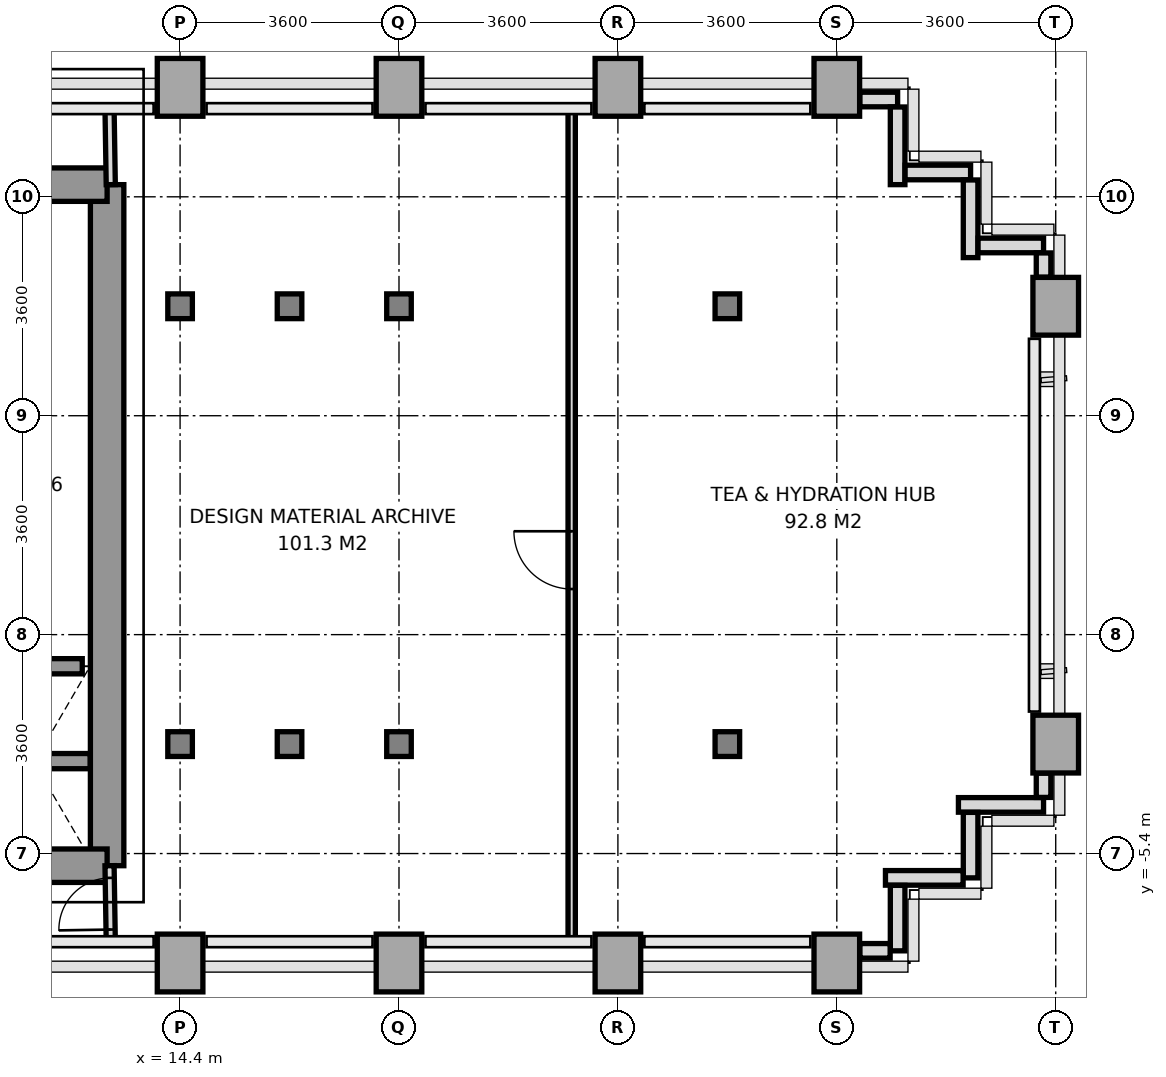
"""IFC4 building model, lengths in metres.
Left out: names, types, materials, properties, quantities, classifications, styles, units other than length and angle.
Written with IfcOpenShell. Run it as: python <this file> out.ifc"""

import sys

from ifc_helpers import new_model, si_unit, direction, frame, frame_2d, origin, origin_2d, place, context, subcontext, project, spatial, rectangle, i_section, extrude, source, transform, mapped, element, fill, save


model = new_model("IFC4")
c1 = context("Model", 3, precision=1e-05, world=origin(), true_north=direction((0.0, 1.0)))
c2 = subcontext(c1, "Body", "Model", "MODEL_VIEW")
j1 = project(units=[si_unit("LENGTHUNIT", "METRE"), si_unit("PLANEANGLEUNIT", "RADIAN")], contexts=[c1])
p1 = place(None, origin())
s1 = spatial("IfcSite", under=j1, at=p1, CompositionType="ELEMENT")
p2 = place(p1, origin())
s2 = spatial("IfcBuilding", under=s1, at=p2, CompositionType="ELEMENT")
p3 = place(p2, frame((0.0, 0.0, 51.0)))
s3 = spatial("IfcBuildingStorey", under=s2, at=p3, CompositionType="ELEMENT", Elevation=51.0)
m1 = source(origin(), c2, "Body", "SweptSolid", [
    extrude(rectangle(XDim=0.75, YDim=0.95, at=origin_2d()), origin(), (0.0, 0.0, 1.0), 3.2),
])
p4 = place(p3, frame((14.4, -7.2, 0.0), z_axis=(0.0, 0.0, 1.0), x_axis=(1.0, 0.0, 0.0)))
e1 = element("IfcColumn", 1, at=p4, inside=s3, PredefinedType="COLUMN", context=c2, shape_type="MappedRepresentation", body=[
    mapped(m1, transform((0.0, 0.0, 0.0), x_axis=(1.0, 0.0, 0.0), y_axis=(0.0, 1.0, 0.0), z_axis=(0.0, 0.0, 1.0), scale=1.0)),
])
m2 = source(origin(), c2, "Body", "SweptSolid", [
    extrude(i_section(OverallWidth=0.404, OverallDepth=0.407, WebThickness=0.022, FlangeThickness=0.035, at=origin_2d()), origin(), (0.0, 0.0, 1.0), 3.2),
])
for number, where, z_axis, x_axis in (
    (2, (14.4, -3.6, 0.0), (0.0, 0.0, 1.0), (1.0, 0.0, 0.0)),
    (3, (14.4, 3.6, 0.0), (0.0, 0.0, 1.0), (1.0, 0.0, 0.0)),
):
    element("IfcColumn", number, at=place(p3, frame(where, z_axis=z_axis, x_axis=x_axis)), inside=s3, PredefinedType="COLUMN", context=c2, shape_type="MappedRepresentation", body=[
        mapped(m2, transform((0.0, 0.0, 0.0), x_axis=(1.0, 0.0, 0.0), y_axis=(0.0, 1.0, 0.0), z_axis=(0.0, 0.0, 1.0), scale=1.0)),
    ])
p5 = place(p3, frame((14.4, 7.2, 0.0), z_axis=(0.0, 0.0, 1.0), x_axis=(1.0, 0.0, 0.0)))
e4 = element("IfcColumn", 4, at=p5, inside=s3, PredefinedType="COLUMN", context=c2, shape_type="MappedRepresentation", body=[
    mapped(m1, transform((0.0, 0.0, 0.0), x_axis=(1.0, 0.0, 0.0), y_axis=(0.0, 1.0, 0.0), z_axis=(0.0, 0.0, 1.0), scale=1.0)),
])
for number, where, z_axis, x_axis in (
    (5, (16.2, -3.6, 0.0), (0.0, 0.0, 1.0), (1.0, 0.0, 0.0)),
    (6, (16.2, 3.6, 0.0), (0.0, 0.0, 1.0), (1.0, 0.0, 0.0)),
):
    element("IfcColumn", number, at=place(p3, frame(where, z_axis=z_axis, x_axis=x_axis)), inside=s3, PredefinedType="COLUMN", context=c2, shape_type="MappedRepresentation", body=[
        mapped(m2, transform((0.0, 0.0, 0.0), x_axis=(1.0, 0.0, 0.0), y_axis=(0.0, 1.0, 0.0), z_axis=(0.0, 0.0, 1.0), scale=1.0)),
    ])
p6 = place(p3, frame((18.0, -7.2, 0.0), z_axis=(0.0, 0.0, 1.0), x_axis=(1.0, 0.0, 0.0)))
e7 = element("IfcColumn", 7, at=p6, inside=s3, PredefinedType="COLUMN", context=c2, shape_type="MappedRepresentation", body=[
    mapped(m1, transform((0.0, 0.0, 0.0), x_axis=(1.0, 0.0, 0.0), y_axis=(0.0, 1.0, 0.0), z_axis=(0.0, 0.0, 1.0), scale=1.0)),
])
for number, where, z_axis, x_axis in (
    (8, (18.0, -3.6, 0.0), (0.0, 0.0, 1.0), (1.0, 0.0, 0.0)),
    (9, (18.0, 3.6, 0.0), (0.0, 0.0, 1.0), (1.0, 0.0, 0.0)),
):
    element("IfcColumn", number, at=place(p3, frame(where, z_axis=z_axis, x_axis=x_axis)), inside=s3, PredefinedType="COLUMN", context=c2, shape_type="MappedRepresentation", body=[
        mapped(m2, transform((0.0, 0.0, 0.0), x_axis=(1.0, 0.0, 0.0), y_axis=(0.0, 1.0, 0.0), z_axis=(0.0, 0.0, 1.0), scale=1.0)),
    ])
for number, where, z_axis, x_axis in (
    (10, (18.0, 7.2, 0.0), (0.0, 0.0, 1.0), (1.0, 0.0, 0.0)),
    (11, (21.6, -7.2, 0.0), (0.0, 0.0, 1.0), (1.0, 0.0, 0.0)),
    (12, (21.6, 7.2, 0.0), (0.0, 0.0, 1.0), (1.0, 0.0, 0.0)),
):
    element("IfcColumn", number, at=place(p3, frame(where, z_axis=z_axis, x_axis=x_axis)), inside=s3, PredefinedType="COLUMN", context=c2, shape_type="MappedRepresentation", body=[
        mapped(m1, transform((0.0, 0.0, 0.0), x_axis=(1.0, 0.0, 0.0), y_axis=(0.0, 1.0, 0.0), z_axis=(0.0, 0.0, 1.0), scale=1.0)),
    ])
for number, where, z_axis, x_axis in (
    (13, (23.4, -3.6, 0.0), (0.0, 0.0, 1.0), (1.0, 0.0, 0.0)),
    (14, (23.4, 3.6, 0.0), (0.0, 0.0, 1.0), (1.0, 0.0, 0.0)),
):
    element("IfcColumn", number, at=place(p3, frame(where, z_axis=z_axis, x_axis=x_axis)), inside=s3, PredefinedType="COLUMN", context=c2, shape_type="MappedRepresentation", body=[
        mapped(m2, transform((0.0, 0.0, 0.0), x_axis=(1.0, 0.0, 0.0), y_axis=(0.0, 1.0, 0.0), z_axis=(0.0, 0.0, 1.0), scale=1.0)),
    ])
for number, where, z_axis, x_axis in (
    (15, (25.2, -7.2, 0.0), (0.0, 0.0, 1.0), (1.0, 0.0, 0.0)),
    (16, (25.2, 7.2, 0.0), (0.0, 0.0, 1.0), (1.0, 0.0, 0.0)),
    (17, (28.8, -3.6, 0.0), (0.0, 0.0, 1.0), (1.0, 0.0, 0.0)),
    (18, (28.8, 3.6, 0.0), (0.0, 0.0, 1.0), (1.0, 0.0, 0.0)),
):
    element("IfcColumn", number, at=place(p3, frame(where, z_axis=z_axis, x_axis=x_axis)), inside=s3, PredefinedType="COLUMN", context=c2, shape_type="MappedRepresentation", body=[
        mapped(m1, transform((0.0, 0.0, 0.0), x_axis=(1.0, 0.0, 0.0), y_axis=(0.0, 1.0, 0.0), z_axis=(0.0, 0.0, 1.0), scale=1.0)),
    ])
p7 = place(p3, frame((28.6, -4.6, 0.0), z_axis=(0.0, 0.0, 1.0), x_axis=(-1.0, 0.0, 0.0)))
e19 = element("IfcWall", 19, at=p7, inside=s3, PredefinedType="PARAPET", context=c2, shape_type="SweptSolid", body=[
    extrude(rectangle(XDim=1.4, YDim=0.24, at=frame_2d((0.7, 0.0))), origin(), (0.0, 0.0, 1.0), 1.15),
])
p8 = place(p3, frame((27.4, -4.723, 0.0), z_axis=(0.0, 0.0, 1.0), x_axis=(0.0, -1.0, 0.0)))
e20 = element("IfcWall", 20, at=p8, inside=s3, PredefinedType="PARAPET", context=c2, shape_type="SweptSolid", body=[
    extrude(rectangle(XDim=1.077, YDim=0.24, at=frame_2d((0.539, 0.0))), origin(), (0.0, 0.0, 1.0), 1.15),
])
p9 = place(p3, frame((27.277, -5.8, 0.0), z_axis=(0.0, 0.0, 1.0), x_axis=(-1.0, 0.0, 0.0)))
e21 = element("IfcWall", 21, at=p9, inside=s3, PredefinedType="PARAPET", context=c2, shape_type="SweptSolid", body=[
    extrude(rectangle(XDim=1.277, YDim=0.24, at=frame_2d((0.639, 0.0))), origin(), (0.0, 0.0, 1.0), 1.15),
])
p10 = place(p3, frame((26.2, -5.923, 0.0), z_axis=(0.0, 0.0, 1.0), x_axis=(0.0, -1.0, 0.0)))
e22 = element("IfcWall", 22, at=p10, inside=s3, PredefinedType="PARAPET", context=c2, shape_type="SweptSolid", body=[
    extrude(rectangle(XDim=1.077, YDim=0.24, at=frame_2d((0.539, 0.0))), origin(), (0.0, 0.0, 1.0), 1.15),
])
p11 = place(p3, frame((26.077, -7.0, 0.0), z_axis=(0.0, 0.0, 1.0), x_axis=(-1.0, 0.0, 0.0)))
e23 = element("IfcWall", 23, at=p11, inside=s3, PredefinedType="PARAPET", context=c2, shape_type="SweptSolid", body=[
    extrude(rectangle(XDim=0.499, YDim=0.24, at=frame_2d((0.25, 0.0))), origin(), (0.0, 0.0, 1.0), 1.15),
])
p12 = place(p3, frame((25.578, 7.0, 0.0), z_axis=(0.0, 0.0, 1.0), x_axis=(1.0, 0.0, 0.0)))
e24 = element("IfcWall", 24, at=p12, inside=s3, PredefinedType="PARAPET", context=c2, shape_type="SweptSolid", body=[
    extrude(rectangle(XDim=0.622, YDim=0.24, at=frame_2d((0.311, 0.0))), origin(), (0.0, 0.0, 1.0), 1.15),
])
p13 = place(p3, frame((26.2, 6.877, 0.0), z_axis=(0.0, 0.0, 1.0), x_axis=(0.0, -1.0, 0.0)))
e25 = element("IfcWall", 25, at=p13, inside=s3, PredefinedType="PARAPET", context=c2, shape_type="SweptSolid", body=[
    extrude(rectangle(XDim=1.277, YDim=0.24, at=frame_2d((0.638, 0.0))), origin(), (0.0, 0.0, 1.0), 1.15),
])
p14 = place(p3, frame((26.323, 5.8, 0.0), z_axis=(0.0, 0.0, 1.0), x_axis=(1.0, 0.0, 0.0)))
e26 = element("IfcWall", 26, at=p14, inside=s3, PredefinedType="PARAPET", context=c2, shape_type="SweptSolid", body=[
    extrude(rectangle(XDim=1.077, YDim=0.24, at=frame_2d((0.539, 0.0))), origin(), (0.0, 0.0, 1.0), 1.15),
])
p15 = place(p3, frame((27.4, 5.677, 0.0), z_axis=(0.0, 0.0, 1.0), x_axis=(0.0, -1.0, 0.0)))
e27 = element("IfcWall", 27, at=p15, inside=s3, PredefinedType="PARAPET", context=c2, shape_type="SweptSolid", body=[
    extrude(rectangle(XDim=1.277, YDim=0.24, at=frame_2d((0.639, 0.0))), origin(), (0.0, 0.0, 1.0), 1.15),
])
p16 = place(p3, frame((27.523, 4.6, 0.0), z_axis=(0.0, 0.0, 1.0), x_axis=(1.0, 0.0, 0.0)))
e28 = element("IfcWall", 28, at=p16, inside=s3, PredefinedType="PARAPET", context=c2, shape_type="SweptSolid", body=[
    extrude(rectangle(XDim=1.077, YDim=0.24, at=frame_2d((0.539, 0.0))), origin(), (0.0, 0.0, 1.0), 1.15),
])
for number, where, z_axis, x_axis in (
    (29, (28.6, 4.477, 0.0), (0.0, 0.0, 1.0), (0.0, -1.0, 0.0)),
    (30, (28.6, -4.078, 0.0), (0.0, 0.0, 1.0), (0.0, -1.0, 0.0)),
):
    element("IfcWall", number, at=place(p3, frame(where, z_axis=z_axis, x_axis=x_axis)), inside=s3, PredefinedType="PARAPET", context=c2, shape_type="SweptSolid", body=[
        extrude(rectangle(XDim=0.399, YDim=0.24, at=frame_2d((0.2, 0.0))), origin(), (0.0, 0.0, 1.0), 1.15),
    ])
p17 = place(p3, frame((13.2, -5.6, 0.0), z_axis=(0.0, 0.0, 1.0), x_axis=(0.0, 1.0, 0.0)))
e31 = element("IfcWall", 31, at=p17, inside=s3, PredefinedType="SHEAR", context=c2, shape_type="SweptSolid", body=[
    extrude(rectangle(XDim=11.2, YDim=0.55, at=frame_2d((5.6, 0.0))), origin(), (0.0, 0.0, 1.0), 3.2),
])
p18 = place(p3, frame((11.381, 5.6, 0.0), z_axis=(0.0, 0.0, 1.0), x_axis=(1.0, 0.0, 0.0)))
e32 = element("IfcWall", 32, at=p18, inside=s3, PredefinedType="SHEAR", context=c2, shape_type="SweptSolid", body=[
    extrude(rectangle(XDim=1.819, YDim=0.55, at=frame_2d((0.909, 0.0))), origin(), (0.0, 0.0, 1.0), 3.2),
])
p19 = place(p3, frame((5.4, -5.6, 0.0), z_axis=(0.0, 0.0, 1.0), x_axis=(1.0, 0.0, 0.0)))
e33 = element("IfcWall", 33, at=p19, inside=s3, PredefinedType="SHEAR", context=c2, shape_type="SweptSolid", body=[
    extrude(rectangle(XDim=7.8, YDim=0.55, at=frame_2d((3.9, 0.0))), origin(), (0.0, 0.0, 1.0), 3.2),
])
p20 = place(p19, frame((3.0, 0.0, 0.0)))
e34 = element("IfcOpeningElement", 34, at=p20, cuts=e33, PredefinedType="OPENING", context=c2, shape_type="SweptSolid", body=[
    extrude(rectangle(XDim=1.2, YDim=2.2, at=frame_2d((0.6, 1.1))), frame((0.0, 0.285, 0.0), z_axis=(0.0, -1.0, 0.0), x_axis=(1.0, 0.0, 0.0)), (0.0, 0.0, 1.0), 0.57),
])
p21 = place(p3, frame((11.08, -3.88, 0.0), z_axis=(0.0, 0.0, 1.0), x_axis=(1.0, 0.0, 0.0)))
e35 = element("IfcWall", 35, at=p21, inside=s3, PredefinedType="SOLIDWALL", context=c2, shape_type="SweptSolid", body=[
    extrude(rectangle(XDim=1.84, YDim=0.25, at=frame_2d((0.92, 0.0))), origin(), (0.0, 0.0, 1.0), 3.2),
])
p22 = place(p3, frame((11.209, -2.32, 0.0), z_axis=(0.0, 0.0, 1.0), x_axis=(1.0, 0.0, 0.0)))
e36 = element("IfcWall", 36, at=p22, inside=s3, PredefinedType="SOLIDWALL", context=c2, shape_type="SweptSolid", body=[
    extrude(rectangle(XDim=1.582, YDim=0.25, at=frame_2d((0.791, 0.0))), origin(), (0.0, 0.0, 1.0), 3.2),
])
p23 = place(p3, frame((13.26, 5.6, 0.0), z_axis=(0.0, 0.0, 1.0), x_axis=(-0.016013571389, 0.999871774545, 0.0)))
e37 = element("IfcWall", 37, at=p23, inside=s3, PredefinedType="PARTITIONING", context=c2, shape_type="SweptSolid", body=[
    extrude(rectangle(XDim=1.25, YDim=0.15, at=frame_2d((0.625, 0.0))), origin(), (0.0, 0.0, 1.0), 3.2),
])
p24 = place(p3, frame((13.26, -6.85, 0.0), z_axis=(0.0, 0.0, 1.0), x_axis=(-0.016013571389, 0.999871774545, 0.0)))
e38 = element("IfcWall", 38, at=p24, inside=s3, PredefinedType="PARTITIONING", context=c2, shape_type="SweptSolid", body=[
    extrude(rectangle(XDim=1.25, YDim=0.15, at=frame_2d((0.625, 0.0))), origin(), (0.0, 0.0, 1.0), 3.2),
])
p25 = place(p24, frame((0.2, 0.0, 0.0)))
e39 = element("IfcOpeningElement", 39, at=p25, cuts=e38, PredefinedType="OPENING", context=c2, shape_type="SweptSolid", body=[
    extrude(rectangle(XDim=0.85, YDim=2.1, at=frame_2d((0.425, 1.05))), frame((0.0, 0.085, 0.0), z_axis=(0.0, -1.0, 0.0), x_axis=(1.0, 0.0, 0.0)), (0.0, 0.0, 1.0), 0.17),
])
p26 = place(p3, frame((20.84, -6.85, 0.0), z_axis=(0.0, 0.0, 1.0), x_axis=(0.0, 1.0, 0.0)))
e40 = element("IfcWall", 40, at=p26, inside=s3, PredefinedType="PARTITIONING", context=c2, shape_type="SweptSolid", body=[
    extrude(rectangle(XDim=13.7, YDim=0.12, at=frame_2d((6.85, 0.0))), origin(), (0.0, 0.0, 1.0), 2.65),
])
p27 = place(p26, frame((5.8, 0.0, 0.0)))
e41 = element("IfcOpeningElement", 41, at=p27, cuts=e40, PredefinedType="OPENING", context=c2, shape_type="SweptSolid", body=[
    extrude(rectangle(XDim=0.95, YDim=2.15, at=frame_2d((0.475, 1.075))), frame((0.0, 0.07, 0.0), z_axis=(0.0, -1.0, 0.0), x_axis=(1.0, 0.0, 0.0)), (0.0, 0.0, 1.0), 0.14),
])
m3 = source(origin(), c2, "Body", "SweptSolid", [
    extrude(rectangle(XDim=0.85, YDim=2.1, at=frame_2d((0.425, 1.05))), frame((0.0, 0.025, 0.0), z_axis=(0.0, -1.0, 0.0), x_axis=(1.0, 0.0, 0.0)), (0.0, 0.0, 1.0), 0.05),
])
p28 = place(p25, origin())
e42 = element("IfcDoor", 42, at=p28, inside=s3, OperationType="SINGLE_SWING_LEFT", PredefinedType="DOOR", context=c2, shape_type="MappedRepresentation", body=[
    mapped(m3, transform((0.0, 0.0, 0.0), x_axis=(1.0, 0.0, 0.0), y_axis=(0.0, 1.0, 0.0), z_axis=(0.0, 0.0, 1.0), scale=1.0)),
])
fill(e39, e42)
m4 = source(origin(), c2, "Body", "SweptSolid", [
    extrude(rectangle(XDim=0.95, YDim=2.15, at=frame_2d((0.475, 1.075))), frame((0.0, 0.025, 0.0), z_axis=(0.0, -1.0, 0.0), x_axis=(1.0, 0.0, 0.0)), (0.0, 0.0, 1.0), 0.05),
])
p29 = place(p27, origin())
e43 = element("IfcDoor", 43, at=p29, inside=s3, OperationType="SINGLE_SWING_RIGHT", PredefinedType="DOOR", context=c2, shape_type="MappedRepresentation", body=[
    mapped(m4, transform((0.0, 0.0, 0.0), x_axis=(1.0, 0.0, 0.0), y_axis=(0.0, 1.0, 0.0), z_axis=(0.0, 0.0, 1.0), scale=1.0)),
])
fill(e41, e43)
save(model, sys.argv[1])
